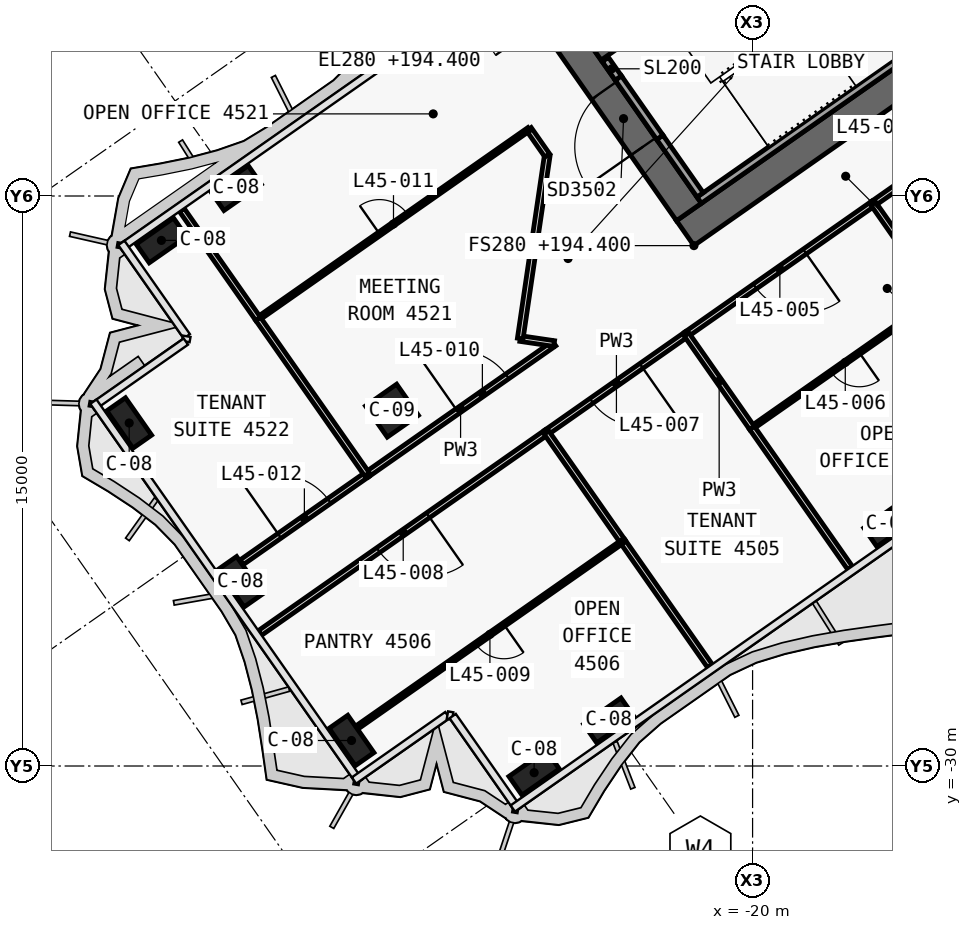
"""IFC4 building model, lengths in metres.
Left out: names, types, materials, properties, quantities, classifications, styles, units other than length and angle.
Written with IfcOpenShell. Run it as: python <this file> out.ifc"""

import sys

from ifc_helpers import new_model, si_unit, direction, frame, frame_2d, origin, origin_2d, place, context, subcontext, project, spatial, polyline, rectangle, outline, extrude, element, fill, save


model = new_model("IFC4")
c1 = context("Model", 3, precision=1e-05, world=origin(), true_north=direction((0.0, 1.0)))
c2 = subcontext(c1, "Body", "Model", "MODEL_VIEW")
j1 = project(units=[si_unit("LENGTHUNIT", "METRE"), si_unit("PLANEANGLEUNIT", "RADIAN")], contexts=[c1])
p1 = place(None, origin())
s1 = spatial("IfcSite", under=j1, at=p1, CompositionType="ELEMENT")
p2 = place(p1, origin())
s2 = spatial("IfcBuilding", under=s1, at=p2, CompositionType="ELEMENT")
p3 = place(p2, frame((0.0, 0.0, 194.4)))
s3 = spatial("IfcBuildingStorey", under=s2, at=p3, CompositionType="ELEMENT", Elevation=194.4)
p4 = place(p3, frame((0.029, -0.712, 0.0), z_axis=(0.0, 0.0, 1.0), x_axis=(-0.819151758019, -0.573576845187, 0.0)))
e1 = element("IfcWall", 1, at=p4, inside=s3, PredefinedType="SHEAR", context=c2, shape_type="SweptSolid", body=[
    extrude(outline(polyline([(26.616, 0.4), (0.56, 0.4), (-0.0, -0.4), (26.616, -0.4), (26.616, 0.4)])), origin(), (0.0, 0.0, 1.0), 3.9),
])
p5 = place(p4, frame((2.966, 0.0, 0.0)))
e2 = element("IfcOpeningElement", 2, at=p5, cuts=e1, PredefinedType="OPENING", context=c2, shape_type="SweptSolid", body=[
    extrude(rectangle(XDim=2.4, YDim=2.1, at=frame_2d((1.2, 1.05))), frame((0.0, 0.41, 0.0), z_axis=(0.0, -1.0, 0.0), x_axis=(1.0, 0.0, 0.0)), (0.0, 0.0, 1.0), 0.82),
])
p6 = place(p4, frame((11.916, 0.0, 0.0)))
e3 = element("IfcOpeningElement", 3, at=p6, cuts=e1, PredefinedType="OPENING", context=c2, shape_type="SweptSolid", body=[
    extrude(rectangle(XDim=2.4, YDim=2.1, at=frame_2d((1.2, 1.05))), frame((0.0, 0.41, 0.0), z_axis=(0.0, -1.0, 0.0), x_axis=(1.0, 0.0, 0.0)), (0.0, 0.0, 1.0), 0.82),
])
p7 = place(p3, frame((-21.675, -15.421, 0.0), z_axis=(0.0, 0.0, 1.0), x_axis=(-0.573581815061, 0.819148278049, 0.0)))
e4 = element("IfcWall", 4, at=p7, inside=s3, PredefinedType="SHEAR", context=c2, shape_type="SweptSolid", body=[
    extrude(outline(polyline([(0.0, 0.4), (0.0, -0.4), (9.6, -0.4), (9.6, 0.4), (0.0, 0.4)])), origin(), (0.0, 0.0, 1.0), 3.9),
])
p8 = place(p7, frame((6.3, 0.0, 0.0)))
e5 = element("IfcOpeningElement", 5, at=p8, cuts=e4, PredefinedType="OPENING", context=c2, shape_type="SweptSolid", body=[
    extrude(rectangle(XDim=1.8, YDim=2.1, at=frame_2d((0.9, 1.05))), frame((0.0, 0.41, 0.0), z_axis=(0.0, -1.0, 0.0), x_axis=(1.0, 0.0, 0.0)), (0.0, 0.0, 1.0), 0.82),
])
p9 = place(p7, frame((2.1, 0.0, 0.0)))
e6 = element("IfcOpeningElement", 6, at=p9, cuts=e4, PredefinedType="OPENING", context=c2, shape_type="SweptSolid", body=[
    extrude(rectangle(XDim=1.8, YDim=2.1, at=frame_2d((0.9, 1.05))), frame((0.0, 0.41, 0.0), z_axis=(0.0, -1.0, 0.0), x_axis=(1.0, 0.0, 0.0)), (0.0, 0.0, 1.0), 0.82),
])
p10 = place(p3, frame((-2.638, 3.768, 0.0), z_axis=(0.0, 0.0, 1.0), x_axis=(-0.81915267502, -0.573575535572, 0.0)))
e7 = element("IfcWall", 7, at=p10, inside=s3, PredefinedType="SHEAR", context=c2, shape_type="SweptSolid", body=[
    extrude(outline(polyline([(26.2, 0.2), (0.0, 0.2), (0.0, -0.2), (26.2, -0.2), (26.2, 0.2)])), origin(), (0.0, 0.0, 1.0), 3.9),
])
p11 = place(p10, frame((1.169, 0.0, 0.0)))
e8 = element("IfcOpeningElement", 8, at=p11, cuts=e7, PredefinedType="OPENING", context=c2, shape_type="SweptSolid", body=[
    extrude(rectangle(XDim=1.1, YDim=2.1, at=frame_2d((0.55, 1.05))), frame((0.0, 0.21, 0.0), z_axis=(0.0, -1.0, 0.0), x_axis=(1.0, 0.0, 0.0)), (0.0, 0.0, 1.0), 0.42),
])
p12 = place(p10, frame((3.206, 0.0, 0.0)))
e9 = element("IfcOpeningElement", 9, at=p12, cuts=e7, PredefinedType="OPENING", context=c2, shape_type="SweptSolid", body=[
    extrude(rectangle(XDim=1.1, YDim=2.1, at=frame_2d((0.55, 1.05))), frame((0.0, 0.21, 0.0), z_axis=(0.0, -1.0, 0.0), x_axis=(1.0, 0.0, 0.0)), (0.0, 0.0, 1.0), 0.42),
])
p13 = place(p10, frame((5.244, 0.0, 0.0)))
e10 = element("IfcOpeningElement", 10, at=p13, cuts=e7, PredefinedType="OPENING", context=c2, shape_type="SweptSolid", body=[
    extrude(rectangle(XDim=1.1, YDim=2.1, at=frame_2d((0.55, 1.05))), frame((0.0, 0.21, 0.0), z_axis=(0.0, -1.0, 0.0), x_axis=(1.0, 0.0, 0.0)), (0.0, 0.0, 1.0), 0.42),
])
p14 = place(p10, frame((7.281, 0.0, 0.0)))
e11 = element("IfcOpeningElement", 11, at=p14, cuts=e7, PredefinedType="OPENING", context=c2, shape_type="SweptSolid", body=[
    extrude(rectangle(XDim=1.1, YDim=2.1, at=frame_2d((0.55, 1.05))), frame((0.0, 0.21, 0.0), z_axis=(0.0, -1.0, 0.0), x_axis=(1.0, 0.0, 0.0)), (0.0, 0.0, 1.0), 0.42),
])
p15 = place(p10, frame((9.688, 0.0, 0.0)))
e12 = element("IfcOpeningElement", 12, at=p15, cuts=e7, PredefinedType="OPENING", context=c2, shape_type="SweptSolid", body=[
    extrude(rectangle(XDim=1.1, YDim=2.1, at=frame_2d((0.55, 1.05))), frame((0.0, 0.21, 0.0), z_axis=(0.0, -1.0, 0.0), x_axis=(1.0, 0.0, 0.0)), (0.0, 0.0, 1.0), 0.42),
])
p16 = place(p10, frame((11.863, 0.0, 0.0)))
e13 = element("IfcOpeningElement", 13, at=p16, cuts=e7, PredefinedType="OPENING", context=c2, shape_type="SweptSolid", body=[
    extrude(rectangle(XDim=1.1, YDim=2.1, at=frame_2d((0.55, 1.05))), frame((0.0, 0.21, 0.0), z_axis=(0.0, -1.0, 0.0), x_axis=(1.0, 0.0, 0.0)), (0.0, 0.0, 1.0), 0.42),
])
p17 = place(p10, frame((14.552, 0.0, 0.0)))
e14 = element("IfcOpeningElement", 14, at=p17, cuts=e7, PredefinedType="OPENING", context=c2, shape_type="SweptSolid", body=[
    extrude(rectangle(XDim=1.0, YDim=2.1, at=frame_2d((0.5, 1.05))), frame((0.0, 0.21, 0.0), z_axis=(0.0, -1.0, 0.0), x_axis=(1.0, 0.0, 0.0)), (0.0, 0.0, 1.0), 0.42),
])
p18 = place(p10, frame((16.627, 0.0, 0.0)))
e15 = element("IfcOpeningElement", 15, at=p18, cuts=e7, PredefinedType="OPENING", context=c2, shape_type="SweptSolid", body=[
    extrude(rectangle(XDim=1.0, YDim=2.1, at=frame_2d((0.5, 1.05))), frame((0.0, 0.21, 0.0), z_axis=(0.0, -1.0, 0.0), x_axis=(1.0, 0.0, 0.0)), (0.0, 0.0, 1.0), 0.42),
])
for number, where, z_axis, x_axis in (
    (16, (-16.41, -23.637, 0.0), (0.0, 0.0, 1.0), (-0.819, -0.574, 0.0)),
    (17, (-23.782, -28.799, 0.0), (0.0, 0.0, 1.0), (-0.819, -0.574, 0.0)),
    (18, (-25.748, -30.176, 0.0), (0.0, 0.0, 1.0), (-0.819, -0.574, 0.0)),
    (19, (-33.591, -14.792, 0.0), (0.0, 0.0, 1.0), (-0.819, -0.574, 0.0)),
    (20, (-35.556, -16.168, 0.0), (0.0, 0.0, 1.0), (-0.819, -0.574, 0.0)),
    (21, (-30.553, -29.329, 0.0), (0.0, 0.0, 1.0), (-0.574, 0.819, 0.0)),
    (22, (-33.479, -25.151, 0.0), (0.0, 0.0, 1.0), (-0.574, 0.819, 0.0)),
    (23, (-36.404, -20.973, 0.0), (0.0, 0.0, 1.0), (-0.574, 0.819, 0.0)),
):
    element("IfcColumn", number, at=place(p3, frame(where, z_axis=z_axis, x_axis=x_axis)), inside=s3, PredefinedType="COLUMN", context=c2, shape_type="SweptSolid", body=[
        extrude(rectangle(XDim=1.2, YDim=0.6, at=origin_2d()), origin(), (0.0, 0.0, 1.0), 3.9),
    ])
p19 = place(p3, frame((-29.49, -20.649, 0.0), z_axis=(0.0, 0.0, 1.0), x_axis=(-0.819152044289, -0.573576436351, 0.0)))
e24 = element("IfcColumn", 24, at=p19, inside=s3, PredefinedType="COLUMN", context=c2, shape_type="SweptSolid", body=[
    extrude(rectangle(XDim=1.0, YDim=1.0, at=origin_2d()), origin(), (0.0, 0.0, 1.0), 3.9),
])
p20 = place(p3, frame((-14.851, -10.521, 0.0), z_axis=(0.0, 0.0, 1.0), x_axis=(-0.819141584393, -0.57359137434, 0.0)))
e25 = element("IfcWall", 25, at=p20, inside=s3, PredefinedType="SOLIDWALL", context=c2, shape_type="SweptSolid", body=[
    extrude(rectangle(XDim=8.0, YDim=0.2, at=frame_2d((4.0, 0.0))), origin(), (0.0, 0.0, 1.0), 3.62),
])
p21 = place(p3, frame((-21.38, -14.97, 0.0), z_axis=(0.0, 0.0, 1.0), x_axis=(-0.573559770908, 0.819163713305, 0.0)))
e26 = element("IfcWall", 26, at=p21, inside=s3, PredefinedType="SOLIDWALL", context=c2, shape_type="SweptSolid", body=[
    extrude(rectangle(XDim=1.85, YDim=0.2, at=frame_2d((0.925, 0.0))), origin(), (0.0, 0.0, 1.0), 3.62),
])
p22 = place(p3, frame((-23.531, -11.898, 0.0), z_axis=(0.0, 0.0, 1.0), x_axis=(-0.573708088123, 0.819059844958, 0.0)))
e27 = element("IfcWall", 27, at=p22, inside=s3, PredefinedType="SOLIDWALL", context=c2, shape_type="SweptSolid", body=[
    extrude(rectangle(XDim=0.6, YDim=0.2, at=frame_2d((0.3, 0.0))), origin(), (0.0, 0.0, 1.0), 3.62),
])
p23 = place(p3, frame((-22.441, -13.455, 2.15), z_axis=(0.0, 0.0, 1.0), x_axis=(-0.573591692345, 0.819141361715, 0.0)))
e28 = element("IfcWall", 28, at=p23, inside=s3, PredefinedType="SOLIDWALL", context=c2, shape_type="SweptSolid", body=[
    extrude(rectangle(XDim=1.9, YDim=0.2, at=frame_2d((0.95, 0.0))), origin(), (0.0, 0.0, 1.0), 1.47),
])
p24 = place(p3, frame((-30.146, -22.33, 0.0), z_axis=(0.0, 0.0, 1.0), x_axis=(0.819136512745, 0.573598617056, 0.0)))
e29 = element("IfcWall", 29, at=p24, inside=s3, PredefinedType="PARTITIONING", context=c2, shape_type="SweptSolid", body=[
    extrude(rectangle(XDim=6.011, YDim=0.15, at=frame_2d((3.006, 0.0))), origin(), (0.0, 0.0, 1.0), 3.0),
])
p25 = place(p24, frame((2.906, 0.0, 0.0)))
e30 = element("IfcOpeningElement", 30, at=p25, cuts=e29, PredefinedType="OPENING", context=c2, shape_type="SweptSolid", body=[
    extrude(rectangle(XDim=1.6, YDim=2.1, at=frame_2d((0.8, 1.05))), frame((0.0, 0.085, 0.0), z_axis=(0.0, -1.0, 0.0), x_axis=(1.0, 0.0, 0.0)), (0.0, 0.0, 1.0), 0.17),
])
p26 = place(p3, frame((-33.445, -24.64, 0.0), z_axis=(0.0, 0.0, 1.0), x_axis=(0.819163639968, 0.573559875649, 0.0)))
e31 = element("IfcWall", 31, at=p26, inside=s3, PredefinedType="PARTITIONING", context=c2, shape_type="SweptSolid", body=[
    extrude(rectangle(XDim=4.032, YDim=0.15, at=frame_2d((2.016, 0.0))), origin(), (0.0, 0.0, 1.0), 3.0),
])
p27 = place(p26, frame((1.216, 0.0, 0.0)))
e32 = element("IfcOpeningElement", 32, at=p27, cuts=e31, PredefinedType="OPENING", context=c2, shape_type="SweptSolid", body=[
    extrude(rectangle(XDim=1.6, YDim=2.1, at=frame_2d((0.8, 1.05))), frame((0.0, 0.085, 0.0), z_axis=(0.0, -1.0, 0.0), x_axis=(1.0, 0.0, 0.0)), (0.0, 0.0, 1.0), 0.17),
])
p28 = place(p3, frame((-14.366, -13.477, 0.0), z_axis=(0.0, 0.0, 1.0), x_axis=(-0.81916700466, -0.573555070134, 0.0)))
e33 = element("IfcWall", 33, at=p28, inside=s3, PredefinedType="PARTITIONING", context=c2, shape_type="SweptSolid", body=[
    extrude(rectangle(XDim=3.004, YDim=0.15, at=frame_2d((1.502, 0.0))), origin(), (0.0, 0.0, 1.0), 3.62),
])
p29 = place(p28, frame((1.052, 0.0, 0.0)))
e34 = element("IfcOpeningElement", 34, at=p29, cuts=e33, PredefinedType="OPENING", context=c2, shape_type="SweptSolid", body=[
    extrude(rectangle(XDim=0.9, YDim=2.1, at=frame_2d((0.45, 1.05))), frame((0.0, 0.085, 0.0), z_axis=(0.0, -1.0, 0.0), x_axis=(1.0, 0.0, 0.0)), (0.0, 0.0, 1.0), 0.17),
])
p30 = place(p3, frame((-16.823, -15.198, 0.0), z_axis=(0.0, 0.0, 1.0), x_axis=(-0.819165052243, -0.573557858619, 0.0)))
e35 = element("IfcWall", 35, at=p30, inside=s3, PredefinedType="PARTITIONING", context=c2, shape_type="SweptSolid", body=[
    extrude(rectangle(XDim=6.004, YDim=0.15, at=frame_2d((3.002, 0.0))), origin(), (0.0, 0.0, 1.0), 3.0),
])
p31 = place(p30, frame((2.202, 0.0, 0.0)))
e36 = element("IfcOpeningElement", 36, at=p31, cuts=e35, PredefinedType="OPENING", context=c2, shape_type="SweptSolid", body=[
    extrude(rectangle(XDim=1.6, YDim=2.1, at=frame_2d((0.8, 1.05))), frame((0.0, 0.085, 0.0), z_axis=(0.0, -1.0, 0.0), x_axis=(1.0, 0.0, 0.0)), (0.0, 0.0, 1.0), 0.17),
])
p32 = place(p3, frame((-21.738, -18.639, 0.0), z_axis=(0.0, 0.0, 1.0), x_axis=(-0.81912240011, -0.573618770298, 0.0)))
e37 = element("IfcWall", 37, at=p32, inside=s3, PredefinedType="PARTITIONING", context=c2, shape_type="SweptSolid", body=[
    extrude(rectangle(XDim=4.504, YDim=0.15, at=frame_2d((2.252, 0.0))), origin(), (0.0, 0.0, 1.0), 3.62),
])
p33 = place(p32, frame((1.452, 0.0, 0.0)))
e38 = element("IfcOpeningElement", 38, at=p33, cuts=e37, PredefinedType="OPENING", context=c2, shape_type="SweptSolid", body=[
    extrude(rectangle(XDim=1.6, YDim=2.1, at=frame_2d((0.8, 1.05))), frame((0.0, 0.085, 0.0), z_axis=(0.0, -1.0, 0.0), x_axis=(1.0, 0.0, 0.0)), (0.0, 0.0, 1.0), 0.17),
])
p34 = place(p3, frame((-25.424, -21.22, 0.0), z_axis=(0.0, 0.0, 1.0), x_axis=(-0.81915089424, -0.573578078788, 0.0)))
e39 = element("IfcWall", 39, at=p34, inside=s3, PredefinedType="PARTITIONING", context=c2, shape_type="SweptSolid", body=[
    extrude(rectangle(XDim=9.202, YDim=0.15, at=frame_2d((4.601, 0.0))), origin(), (0.0, 0.0, 1.0), 2.9),
])
p35 = place(p34, frame((3.801, 0.0, 0.0)))
e40 = element("IfcOpeningElement", 40, at=p35, cuts=e39, PredefinedType="OPENING", context=c2, shape_type="SweptSolid", body=[
    extrude(rectangle(XDim=1.6, YDim=2.1, at=frame_2d((0.8, 1.05))), frame((0.0, 0.085, 0.0), z_axis=(0.0, -1.0, 0.0), x_axis=(1.0, 0.0, 0.0)), (0.0, 0.0, 1.0), 0.17),
])
p36 = place(p3, frame((-25.221, -18.883, 0.0), z_axis=(0.0, 0.0, 1.0), x_axis=(-0.989300612726, 0.145891389948, 0.0)))
e41 = element("IfcWall", 41, at=p36, inside=s3, PredefinedType="PARTITIONING", context=c2, shape_type="SweptSolid", body=[
    extrude(rectangle(XDim=0.902, YDim=0.15, at=frame_2d((0.451, 0.0))), origin(), (0.0, 0.0, 1.0), 3.0),
])
p37 = place(p3, frame((-26.114, -18.751, 0.0), z_axis=(0.0, 0.0, 1.0), x_axis=(0.145889309857, 0.989300919473, 0.0)))
e42 = element("IfcWall", 42, at=p37, inside=s3, PredefinedType="PARTITIONING", context=c2, shape_type="SweptSolid", body=[
    extrude(rectangle(XDim=4.871, YDim=0.15, at=frame_2d((2.436, 0.0))), origin(), (0.0, 0.0, 1.0), 3.0),
])
p38 = place(p3, frame((-25.403, -13.932, 0.0), z_axis=(0.0, 0.0, 1.0), x_axis=(-0.573520604239, 0.819191135519, 0.0)))
e43 = element("IfcWall", 43, at=p38, inside=s3, PredefinedType="PARTITIONING", context=c2, shape_type="SweptSolid", body=[
    extrude(rectangle(XDim=0.844, YDim=0.15, at=frame_2d((0.422, 0.0))), origin(), (0.0, 0.0, 1.0), 3.62),
])
p39 = place(p3, frame((-33.013, -18.232, 0.0), z_axis=(0.0, 0.0, 1.0), x_axis=(0.819151510326, 0.573577198928, 0.0)))
e44 = element("IfcWall", 44, at=p39, inside=s3, PredefinedType="PARTITIONING", context=c2, shape_type="SweptSolid", body=[
    extrude(rectangle(XDim=8.702, YDim=0.1, at=frame_2d((4.351, 0.0))), origin(), (0.0, 0.0, 1.0), 3.0),
])
p40 = place(p39, frame((3.901, 0.0, 0.0)))
e45 = element("IfcOpeningElement", 45, at=p40, cuts=e44, PredefinedType="OPENING", context=c2, shape_type="SweptSolid", body=[
    extrude(rectangle(XDim=0.9, YDim=2.1, at=frame_2d((0.45, 1.05))), frame((0.0, 0.06, 0.0), z_axis=(0.0, -1.0, 0.0), x_axis=(1.0, 0.0, 0.0)), (0.0, 0.0, 1.0), 0.12),
])
p41 = place(p3, frame((-33.013, -18.232, 0.0), z_axis=(0.0, 0.0, 1.0), x_axis=(-0.573555999232, 0.819166354134, 0.0)))
e46 = element("IfcWall", 46, at=p41, inside=s3, PredefinedType="PARTITIONING", context=c2, shape_type="SweptSolid", body=[
    extrude(rectangle(XDim=3.499, YDim=0.15, at=frame_2d((1.75, 0.0))), origin(), (0.0, 0.0, 1.0), 2.9),
])
p42 = place(p3, frame((-30.145, -22.328, 0.0), z_axis=(0.0, 0.0, 1.0), x_axis=(-0.573563925118, 0.819160804606, 0.0)))
e47 = element("IfcWall", 47, at=p42, inside=s3, PredefinedType="PARTITIONING", context=c2, shape_type="SweptSolid", body=[
    extrude(rectangle(XDim=5.0, YDim=0.15, at=frame_2d((2.5, 0.0))), origin(), (0.0, 0.0, 1.0), 3.0),
])
p43 = place(p3, frame((-15.103, -17.658, 0.0), z_axis=(0.0, 0.0, 1.0), x_axis=(-0.573604249862, 0.819132568355, 0.0)))
e48 = element("IfcWall", 48, at=p43, inside=s3, PredefinedType="PARTITIONING", context=c2, shape_type="SweptSolid", body=[
    extrude(rectangle(XDim=3.002, YDim=0.15, at=frame_2d((1.501, 0.0))), origin(), (0.0, 0.0, 1.0), 3.62),
])
p44 = place(p3, frame((-15.104, -17.657, 0.0), z_axis=(0.0, 0.0, 1.0), x_axis=(-0.819163097304, -0.573560650686, 0.0)))
e49 = element("IfcWall", 49, at=p44, inside=s3, PredefinedType="PARTITIONING", context=c2, shape_type="SweptSolid", body=[
    extrude(rectangle(XDim=6.0, YDim=0.1, at=frame_2d((3.0, 0.0))), origin(), (0.0, 0.0, 1.0), 3.0),
])
p45 = place(p44, frame((2.55, 0.0, 0.0)))
e50 = element("IfcOpeningElement", 50, at=p45, cuts=e49, PredefinedType="OPENING", context=c2, shape_type="SweptSolid", body=[
    extrude(rectangle(XDim=0.9, YDim=2.1, at=frame_2d((0.45, 1.05))), frame((0.0, 0.06, 0.0), z_axis=(0.0, -1.0, 0.0), x_axis=(1.0, 0.0, 0.0)), (0.0, 0.0, 1.0), 0.12),
])
p46 = place(p3, frame((-17.438, -24.784, 0.0), z_axis=(0.0, 0.0, 1.0), x_axis=(-0.573589807488, 0.819142681555, 0.0)))
e51 = element("IfcWall", 51, at=p46, inside=s3, PredefinedType="PARTITIONING", context=c2, shape_type="SweptSolid", body=[
    extrude(rectangle(XDim=4.499, YDim=0.15, at=frame_2d((2.25, 0.0))), origin(), (0.0, 0.0, 1.0), 2.9),
])
p47 = place(p3, frame((-20.019, -21.098, 0.0), z_axis=(0.0, 0.0, 1.0), x_axis=(-0.573598887793, 0.819136323161, 0.0)))
e52 = element("IfcWall", 52, at=p47, inside=s3, PredefinedType="PARTITIONING", context=c2, shape_type="SweptSolid", body=[
    extrude(rectangle(XDim=3.0, YDim=0.15, at=frame_2d((1.5, 0.0))), origin(), (0.0, 0.0, 1.0), 3.62),
])
p48 = place(p3, frame((-21.124, -27.365, 0.0), z_axis=(0.0, 0.0, 1.0), x_axis=(-0.573593387921, 0.81914017441, 0.0)))
e53 = element("IfcWall", 53, at=p48, inside=s3, PredefinedType="PARTITIONING", context=c2, shape_type="SweptSolid", body=[
    extrude(rectangle(XDim=4.001, YDim=0.15, at=frame_2d((2.0, 0.0))), origin(), (0.0, 0.0, 1.0), 2.9),
])
p49 = place(p3, frame((-23.417, -24.09, 0.0), z_axis=(0.0, 0.0, 1.0), x_axis=(-0.573602698703, 0.819133654565, 0.0)))
e54 = element("IfcWall", 54, at=p49, inside=s3, PredefinedType="PARTITIONING", context=c2, shape_type="SweptSolid", body=[
    extrude(rectangle(XDim=3.502, YDim=0.15, at=frame_2d((1.751, 0.0))), origin(), (0.0, 0.0, 1.0), 3.62),
])
p50 = place(p3, frame((-23.418, -24.09, 0.0), z_axis=(0.0, 0.0, 1.0), x_axis=(-0.819151233973, -0.5735775936, 0.0)))
e55 = element("IfcWall", 55, at=p50, inside=s3, PredefinedType="PARTITIONING", context=c2, shape_type="SweptSolid", body=[
    extrude(rectangle(XDim=8.53, YDim=0.1, at=frame_2d((4.265, 0.0))), origin(), (0.0, 0.0, 1.0), 3.0),
])
p51 = place(p50, frame((3.815, 0.0, 0.0)))
e56 = element("IfcOpeningElement", 56, at=p51, cuts=e55, PredefinedType="OPENING", context=c2, shape_type="SweptSolid", body=[
    extrude(rectangle(XDim=0.9, YDim=2.1, at=frame_2d((0.45, 1.05))), frame((0.0, 0.06, 0.0), z_axis=(0.0, -1.0, 0.0), x_axis=(1.0, 0.0, 0.0)), (0.0, 0.0, 1.0), 0.12),
])
p52 = place(p9, origin())
e57 = element("IfcDoor", 57, at=p52, inside=s3, OperationType="DOUBLE_DOOR_SINGLE_SWING", PredefinedType="DOOR", context=c2, shape_type="SweptSolid", body=[
    extrude(rectangle(XDim=1.8, YDim=2.1, at=frame_2d((0.9, 1.05))), frame((0.0, 0.025, 0.0), z_axis=(0.0, -1.0, 0.0), x_axis=(1.0, 0.0, 0.0)), (0.0, 0.0, 1.0), 0.05),
])
fill(e6, e57)
p53 = place(p31, origin())
e58 = element("IfcDoor", 58, at=p53, inside=s3, OperationType="DOUBLE_DOOR_SINGLE_SWING", PredefinedType="DOOR", context=c2, shape_type="SweptSolid", body=[
    extrude(rectangle(XDim=1.6, YDim=2.1, at=frame_2d((0.8, 1.05))), frame((0.0, 0.025, 0.0), z_axis=(0.0, -1.0, 0.0), x_axis=(1.0, 0.0, 0.0)), (0.0, 0.0, 1.0), 0.05),
])
fill(e36, e58)
p54 = place(p45, origin())
e59 = element("IfcDoor", 59, at=p54, inside=s3, OperationType="SINGLE_SWING_RIGHT", PredefinedType="DOOR", context=c2, shape_type="SweptSolid", body=[
    extrude(rectangle(XDim=0.9, YDim=2.1, at=frame_2d((0.45, 1.05))), frame((0.0, 0.025, 0.0), z_axis=(0.0, -1.0, 0.0), x_axis=(1.0, 0.0, 0.0)), (0.0, 0.0, 1.0), 0.05),
])
fill(e50, e59)
p55 = place(p33, origin())
e60 = element("IfcDoor", 60, at=p55, inside=s3, OperationType="DOUBLE_DOOR_SINGLE_SWING", PredefinedType="DOOR", context=c2, shape_type="SweptSolid", body=[
    extrude(rectangle(XDim=1.6, YDim=2.1, at=frame_2d((0.8, 1.05))), frame((0.0, 0.025, 0.0), z_axis=(0.0, -1.0, 0.0), x_axis=(1.0, 0.0, 0.0)), (0.0, 0.0, 1.0), 0.05),
])
fill(e38, e60)
p56 = place(p35, origin())
e61 = element("IfcDoor", 61, at=p56, inside=s3, OperationType="DOUBLE_DOOR_SINGLE_SWING", PredefinedType="DOOR", context=c2, shape_type="SweptSolid", body=[
    extrude(rectangle(XDim=1.6, YDim=2.1, at=frame_2d((0.8, 1.05))), frame((0.0, 0.025, 0.0), z_axis=(0.0, -1.0, 0.0), x_axis=(1.0, 0.0, 0.0)), (0.0, 0.0, 1.0), 0.05),
])
fill(e40, e61)
p57 = place(p51, origin())
e62 = element("IfcDoor", 62, at=p57, inside=s3, OperationType="SINGLE_SWING_RIGHT", PredefinedType="DOOR", context=c2, shape_type="SweptSolid", body=[
    extrude(rectangle(XDim=0.9, YDim=2.1, at=frame_2d((0.45, 1.05))), frame((0.0, 0.025, 0.0), z_axis=(0.0, -1.0, 0.0), x_axis=(1.0, 0.0, 0.0)), (0.0, 0.0, 1.0), 0.05),
])
fill(e56, e62)
p58 = place(p25, origin())
e63 = element("IfcDoor", 63, at=p58, inside=s3, OperationType="DOUBLE_DOOR_SINGLE_SWING", PredefinedType="DOOR", context=c2, shape_type="SweptSolid", body=[
    extrude(rectangle(XDim=1.6, YDim=2.1, at=frame_2d((0.8, 1.05))), frame((0.0, 0.025, 0.0), z_axis=(0.0, -1.0, 0.0), x_axis=(1.0, 0.0, 0.0)), (0.0, 0.0, 1.0), 0.05),
])
fill(e30, e63)
p59 = place(p40, origin())
e64 = element("IfcDoor", 64, at=p59, inside=s3, OperationType="SINGLE_SWING_LEFT", PredefinedType="DOOR", context=c2, shape_type="SweptSolid", body=[
    extrude(rectangle(XDim=0.9, YDim=2.1, at=frame_2d((0.45, 1.05))), frame((0.0, 0.025, 0.0), z_axis=(0.0, -1.0, 0.0), x_axis=(1.0, 0.0, 0.0)), (0.0, 0.0, 1.0), 0.05),
])
fill(e45, e64)
p60 = place(p27, origin())
e65 = element("IfcDoor", 65, at=p60, inside=s3, OperationType="DOUBLE_DOOR_SINGLE_SWING", PredefinedType="DOOR", context=c2, shape_type="SweptSolid", body=[
    extrude(rectangle(XDim=1.6, YDim=2.1, at=frame_2d((0.8, 1.05))), frame((0.0, 0.025, 0.0), z_axis=(0.0, -1.0, 0.0), x_axis=(1.0, 0.0, 0.0)), (0.0, 0.0, 1.0), 0.05),
])
fill(e32, e65)
save(model, sys.argv[1])
